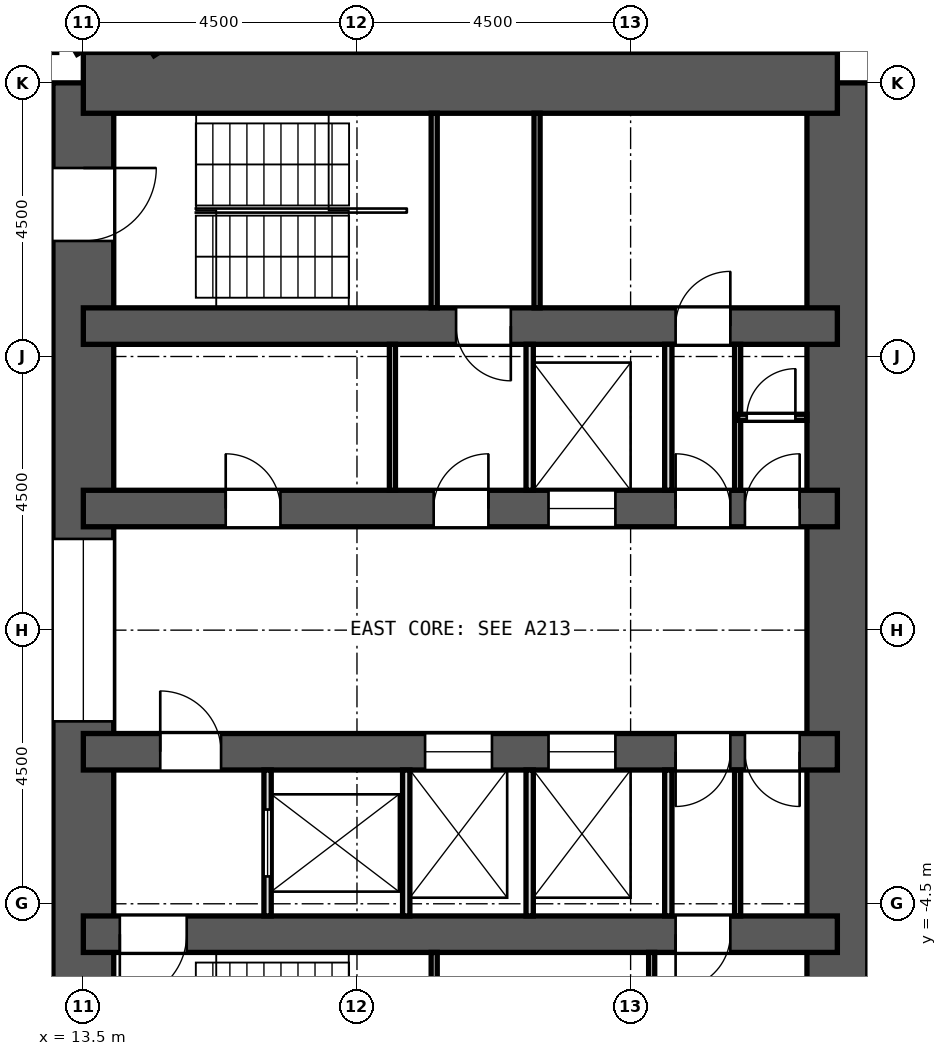
"""IFC4 building model, lengths in metres.
Left out: names, types, materials, properties, quantities, classifications, styles, units other than length and angle.
Written with IfcOpenShell. Run it as: python <this file> out.ifc"""

import sys

from ifc_helpers import new_model, si_unit, direction, frame, frame_2d, origin, place, context, subcontext, project, spatial, rectangle, extrude, element, fill, save


model = new_model("IFC4")
c1 = context("Model", 3, precision=1e-05, world=origin(), true_north=direction((0.0, 1.0)))
c2 = subcontext(c1, "Body", "Model", "MODEL_VIEW")
j1 = project(units=[si_unit("LENGTHUNIT", "METRE"), si_unit("PLANEANGLEUNIT", "RADIAN")], contexts=[c1])
p1 = place(None, origin())
s1 = spatial("IfcSite", under=j1, at=p1, CompositionType="ELEMENT")
p2 = place(p1, origin())
s2 = spatial("IfcBuilding", under=s1, at=p2, CompositionType="ELEMENT")
p3 = place(p2, frame((0.0, 0.0, 65.9)))
s3 = spatial("IfcBuildingStorey", under=s2, at=p3, CompositionType="ELEMENT", Elevation=65.9)
p4 = place(p3, frame((13.5, -9.0, 0.0), z_axis=(0.0, 0.0, 1.0), x_axis=(0.0, 1.0, 0.0)))
e1 = element("IfcWall", 1, at=p4, inside=s3, PredefinedType="SHEAR", context=c2, shape_type="SweptSolid", body=[
    extrude(rectangle(XDim=18.0, YDim=1.0, at=frame_2d((9.0, 0.0))), origin(), (0.0, 0.0, 1.0), 3.3),
])
p5 = place(p4, frame((15.4, 0.0, 0.0)))
e2 = element("IfcOpeningElement", 2, at=p5, cuts=e1, PredefinedType="OPENING", context=c2, shape_type="SweptSolid", body=[
    extrude(rectangle(XDim=1.2, YDim=2.1, at=frame_2d((0.6, 1.05))), frame((0.0, 0.512, 0.0), z_axis=(0.0, -1.0, 0.0), x_axis=(1.0, 0.0, 0.0)), (0.0, 0.0, 1.0), 1.024),
])
p6 = place(p4, frame((1.4, 0.0, 0.0)))
e3 = element("IfcOpeningElement", 3, at=p6, cuts=e1, PredefinedType="OPENING", context=c2, shape_type="SweptSolid", body=[
    extrude(rectangle(XDim=1.2, YDim=2.1, at=frame_2d((0.6, 1.05))), frame((0.0, 0.512, 0.0), z_axis=(0.0, -1.0, 0.0), x_axis=(1.0, 0.0, 0.0)), (0.0, 0.0, 1.0), 1.024),
])
p7 = place(p4, frame((7.5, 0.0, 0.0)))
e4 = element("IfcOpeningElement", 4, at=p7, cuts=e1, PredefinedType="OPENING", context=c2, shape_type="SweptSolid", body=[
    extrude(rectangle(XDim=3.0, YDim=2.4, at=frame_2d((1.5, 1.2))), frame((0.0, 0.512, 0.0), z_axis=(0.0, -1.0, 0.0), x_axis=(1.0, 0.0, 0.0)), (0.0, 0.0, 1.0), 1.024),
])
p8 = place(p3, frame((25.9, -9.0, 0.0), z_axis=(0.0, 0.0, 1.0), x_axis=(0.0, 1.0, 0.0)))
e5 = element("IfcWall", 5, at=p8, inside=s3, PredefinedType="SHEAR", context=c2, shape_type="SweptSolid", body=[
    extrude(rectangle(XDim=18.0, YDim=1.0, at=frame_2d((9.0, 0.0))), origin(), (0.0, 0.0, 1.0), 3.3),
])
p9 = place(p3, frame((13.5, 9.0, 0.0), z_axis=(0.0, 0.0, 1.0), x_axis=(1.0, 0.0, 0.0)))
e6 = element("IfcWall", 6, at=p9, inside=s3, PredefinedType="SHEAR", context=c2, shape_type="SweptSolid", body=[
    extrude(rectangle(XDim=12.4, YDim=1.0, at=frame_2d((6.2, 0.0))), origin(), (0.0, 0.0, 1.0), 3.3),
])
p10 = place(p3, frame((13.5, 5.0, 0.0), z_axis=(0.0, 0.0, 1.0), x_axis=(1.0, 0.0, 0.0)))
e7 = element("IfcWall", 7, at=p10, inside=s3, PredefinedType="SHEAR", context=c2, shape_type="SweptSolid", body=[
    extrude(rectangle(XDim=12.4, YDim=0.6, at=frame_2d((6.2, 0.0))), origin(), (0.0, 0.0, 1.0), 3.3),
])
p11 = place(p10, frame((6.13, 0.0, 0.0)))
e8 = element("IfcOpeningElement", 8, at=p11, cuts=e7, PredefinedType="OPENING", context=c2, shape_type="SweptSolid", body=[
    extrude(rectangle(XDim=0.9, YDim=2.1, at=frame_2d((0.45, 1.05))), frame((0.0, 0.312, 0.0), z_axis=(0.0, -1.0, 0.0), x_axis=(1.0, 0.0, 0.0)), (0.0, 0.0, 1.0), 0.624),
])
p12 = place(p10, frame((9.74, 0.0, 0.0)))
e9 = element("IfcOpeningElement", 9, at=p12, cuts=e7, PredefinedType="OPENING", context=c2, shape_type="SweptSolid", body=[
    extrude(rectangle(XDim=0.9, YDim=2.1, at=frame_2d((0.45, 1.05))), frame((0.0, 0.312, 0.0), z_axis=(0.0, -1.0, 0.0), x_axis=(1.0, 0.0, 0.0)), (0.0, 0.0, 1.0), 0.624),
])
p13 = place(p3, frame((13.5, -5.0, 0.0), z_axis=(0.0, 0.0, 1.0), x_axis=(1.0, 0.0, 0.0)))
e10 = element("IfcWall", 10, at=p13, inside=s3, PredefinedType="SHEAR", context=c2, shape_type="SweptSolid", body=[
    extrude(rectangle(XDim=12.4, YDim=0.6, at=frame_2d((6.2, 0.0))), origin(), (0.0, 0.0, 1.0), 3.3),
])
p14 = place(p13, frame((9.74, 0.0, 0.0)))
e11 = element("IfcOpeningElement", 11, at=p14, cuts=e10, PredefinedType="OPENING", context=c2, shape_type="SweptSolid", body=[
    extrude(rectangle(XDim=0.9, YDim=2.1, at=frame_2d((0.45, 1.05))), frame((0.0, 0.312, 0.0), z_axis=(0.0, -1.0, 0.0), x_axis=(1.0, 0.0, 0.0)), (0.0, 0.0, 1.0), 0.624),
])
p15 = place(p13, frame((0.6, 0.0, 0.0)))
e12 = element("IfcOpeningElement", 12, at=p15, cuts=e10, PredefinedType="OPENING", context=c2, shape_type="SweptSolid", body=[
    extrude(rectangle(XDim=1.1, YDim=2.1, at=frame_2d((0.55, 1.05))), frame((0.0, 0.312, 0.0), z_axis=(0.0, -1.0, 0.0), x_axis=(1.0, 0.0, 0.0)), (0.0, 0.0, 1.0), 0.624),
])
p16 = place(p3, frame((13.5, 2.0, 0.0), z_axis=(0.0, 0.0, 1.0), x_axis=(1.0, 0.0, 0.0)))
e13 = element("IfcWall", 13, at=p16, inside=s3, PredefinedType="SHEAR", context=c2, shape_type="SweptSolid", body=[
    extrude(rectangle(XDim=12.4, YDim=0.6, at=frame_2d((6.2, 0.0))), origin(), (0.0, 0.0, 1.0), 3.3),
])
p17 = place(p16, frame((7.65, 0.0, 0.0)))
e14 = element("IfcOpeningElement", 14, at=p17, cuts=e13, PredefinedType="OPENING", context=c2, shape_type="SweptSolid", body=[
    extrude(rectangle(XDim=1.1, YDim=2.1, at=frame_2d((0.55, 1.05))), frame((0.0, 0.312, 0.0), z_axis=(0.0, -1.0, 0.0), x_axis=(1.0, 0.0, 0.0)), (0.0, 0.0, 1.0), 0.624),
])
p18 = place(p16, frame((2.341, 0.0, 0.0)))
e15 = element("IfcOpeningElement", 15, at=p18, cuts=e13, PredefinedType="OPENING", context=c2, shape_type="SweptSolid", body=[
    extrude(rectangle(XDim=0.9, YDim=2.1, at=frame_2d((0.45, 1.05))), frame((0.0, 0.312, 0.0), z_axis=(0.0, -1.0, 0.0), x_axis=(1.0, 0.0, 0.0)), (0.0, 0.0, 1.0), 0.624),
])
p19 = place(p16, frame((5.761, 0.0, 0.0)))
e16 = element("IfcOpeningElement", 16, at=p19, cuts=e13, PredefinedType="OPENING", context=c2, shape_type="SweptSolid", body=[
    extrude(rectangle(XDim=0.9, YDim=2.1, at=frame_2d((0.45, 1.05))), frame((0.0, 0.312, 0.0), z_axis=(0.0, -1.0, 0.0), x_axis=(1.0, 0.0, 0.0)), (0.0, 0.0, 1.0), 0.624),
])
p20 = place(p16, frame((9.74, 0.0, 0.0)))
e17 = element("IfcOpeningElement", 17, at=p20, cuts=e13, PredefinedType="OPENING", context=c2, shape_type="SweptSolid", body=[
    extrude(rectangle(XDim=0.9, YDim=2.1, at=frame_2d((0.45, 1.05))), frame((0.0, 0.312, 0.0), z_axis=(0.0, -1.0, 0.0), x_axis=(1.0, 0.0, 0.0)), (0.0, 0.0, 1.0), 0.624),
])
p21 = place(p16, frame((10.88, 0.0, 0.0)))
e18 = element("IfcOpeningElement", 18, at=p21, cuts=e13, PredefinedType="OPENING", context=c2, shape_type="SweptSolid", body=[
    extrude(rectangle(XDim=0.9, YDim=2.1, at=frame_2d((0.45, 1.05))), frame((0.0, 0.312, 0.0), z_axis=(0.0, -1.0, 0.0), x_axis=(1.0, 0.0, 0.0)), (0.0, 0.0, 1.0), 0.624),
])
p22 = place(p3, frame((13.5, -2.0, 0.0), z_axis=(0.0, 0.0, 1.0), x_axis=(1.0, 0.0, 0.0)))
e19 = element("IfcWall", 19, at=p22, inside=s3, PredefinedType="SHEAR", context=c2, shape_type="SweptSolid", body=[
    extrude(rectangle(XDim=12.4, YDim=0.6, at=frame_2d((6.2, 0.0))), origin(), (0.0, 0.0, 1.0), 3.3),
])
p23 = place(p22, frame((5.62, 0.0, 0.0)))
e20 = element("IfcOpeningElement", 20, at=p23, cuts=e19, PredefinedType="OPENING", context=c2, shape_type="SweptSolid", body=[
    extrude(rectangle(XDim=1.1, YDim=2.1, at=frame_2d((0.55, 1.05))), frame((0.0, 0.312, 0.0), z_axis=(0.0, -1.0, 0.0), x_axis=(1.0, 0.0, 0.0)), (0.0, 0.0, 1.0), 0.624),
])
p24 = place(p22, frame((7.65, 0.0, 0.0)))
e21 = element("IfcOpeningElement", 21, at=p24, cuts=e19, PredefinedType="OPENING", context=c2, shape_type="SweptSolid", body=[
    extrude(rectangle(XDim=1.1, YDim=2.1, at=frame_2d((0.55, 1.05))), frame((0.0, 0.312, 0.0), z_axis=(0.0, -1.0, 0.0), x_axis=(1.0, 0.0, 0.0)), (0.0, 0.0, 1.0), 0.624),
])
p25 = place(p22, frame((1.265, 0.0, 0.0)))
e22 = element("IfcOpeningElement", 22, at=p25, cuts=e19, PredefinedType="OPENING", context=c2, shape_type="SweptSolid", body=[
    extrude(rectangle(XDim=1.0, YDim=2.1, at=frame_2d((0.5, 1.05))), frame((0.0, 0.312, 0.0), z_axis=(0.0, -1.0, 0.0), x_axis=(1.0, 0.0, 0.0)), (0.0, 0.0, 1.0), 0.624),
])
p26 = place(p22, frame((9.74, 0.0, 0.0)))
e23 = element("IfcOpeningElement", 23, at=p26, cuts=e19, PredefinedType="OPENING", context=c2, shape_type="SweptSolid", body=[
    extrude(rectangle(XDim=0.9, YDim=2.1, at=frame_2d((0.45, 1.05))), frame((0.0, 0.312, 0.0), z_axis=(0.0, -1.0, 0.0), x_axis=(1.0, 0.0, 0.0)), (0.0, 0.0, 1.0), 0.624),
])
p27 = place(p22, frame((10.88, 0.0, 0.0)))
e24 = element("IfcOpeningElement", 24, at=p27, cuts=e19, PredefinedType="OPENING", context=c2, shape_type="SweptSolid", body=[
    extrude(rectangle(XDim=0.9, YDim=2.1, at=frame_2d((0.45, 1.05))), frame((0.0, 0.312, 0.0), z_axis=(0.0, -1.0, 0.0), x_axis=(1.0, 0.0, 0.0)), (0.0, 0.0, 1.0), 0.624),
])
p28 = place(p3, frame((27.523, 7.971, 0.0), z_axis=(0.0, 0.0, 1.0), x_axis=(-0.342028474173, 0.939689588564, 0.0)))
e25 = element("IfcWall", 25, at=p28, inside=s3, PredefinedType="SOLIDWALL", context=c2, shape_type="SweptSolid", body=[
    extrude(rectangle(XDim=3.846, YDim=0.6, at=frame_2d((1.923, 0.0))), origin(), (0.0, 0.0, 1.0), 2.75),
])
p29 = place(p3, frame((13.035, 10.222, 0.0), z_axis=(0.0, 0.0, 1.0), x_axis=(0.49991670217, -0.866073490468, 0.0)))
e26 = element("IfcWall", 26, at=p29, inside=s3, PredefinedType="PARTITIONING", context=c2, shape_type="SweptSolid", body=[
    extrude(rectangle(XDim=0.834, YDim=0.125, at=frame_2d((0.417, 0.0))), origin(), (0.0, 0.0, 1.0), 2.75),
])
p30 = place(p3, frame((14.629, 9.5, 0.0), z_axis=(0.0, 0.0, 1.0), x_axis=(0.838785586694, 0.544461880717, 0.0)))
e27 = element("IfcWall", 27, at=p30, inside=s3, PredefinedType="PARTITIONING", context=c2, shape_type="SweptSolid", body=[
    extrude(rectangle(XDim=1.321, YDim=0.125, at=frame_2d((0.66, 0.0))), origin(), (0.0, 0.0, 1.0), 2.75),
])
p31 = place(p3, frame((18.583, 2.3, 0.0), z_axis=(0.0, 0.0, 1.0), x_axis=(0.0, 1.0, 0.0)))
e28 = element("IfcWall", 28, at=p31, inside=s3, PredefinedType="PARTITIONING", context=c2, shape_type="SweptSolid", body=[
    extrude(rectangle(XDim=2.4, YDim=0.1, at=frame_2d((1.2, 0.0))), origin(), (0.0, 0.0, 1.0), 2.75),
])
for number, where, z_axis, x_axis in (
    (29, (20.84, 2.3, 0.0), (0.0, 0.0, 1.0), (0.0, 1.0, 0.0)),
    (30, (23.12, 2.3, 0.0), (0.0, 0.0, 1.0), (0.0, 1.0, 0.0)),
):
    element("IfcWall", number, at=place(p3, frame(where, z_axis=z_axis, x_axis=x_axis)), inside=s3, PredefinedType="PARTITIONING", context=c2, shape_type="SweptSolid", body=[
        extrude(rectangle(XDim=2.4, YDim=0.12, at=frame_2d((1.2, 0.0))), origin(), (0.0, 0.0, 1.0), 2.75),
    ])
p32 = place(p3, frame((24.26, 2.3, 0.0), z_axis=(0.0, 0.0, 1.0), x_axis=(0.0, 1.0, 0.0)))
e31 = element("IfcWall", 31, at=p32, inside=s3, PredefinedType="PARTITIONING", context=c2, shape_type="SweptSolid", body=[
    extrude(rectangle(XDim=2.4, YDim=0.1, at=frame_2d((1.2, 0.0))), origin(), (0.0, 0.0, 1.0), 2.75),
])
p33 = place(p3, frame((16.53, -4.7, 0.0), z_axis=(0.0, 0.0, 1.0), x_axis=(0.0, 1.0, 0.0)))
e32 = element("IfcWall", 32, at=p33, inside=s3, PredefinedType="PARTITIONING", context=c2, shape_type="SweptSolid", body=[
    extrude(rectangle(XDim=2.4, YDim=0.12, at=frame_2d((1.2, 0.0))), origin(), (0.0, 0.0, 1.0), 2.75),
])
p34 = place(p33, frame((0.65, 0.0, 0.0)))
e33 = element("IfcOpeningElement", 33, at=p34, cuts=e32, PredefinedType="OPENING", context=c2, shape_type="SweptSolid", body=[
    extrude(rectangle(XDim=1.1, YDim=2.1, at=frame_2d((0.55, 1.05))), frame((0.0, 0.072, 0.0), z_axis=(0.0, -1.0, 0.0), x_axis=(1.0, 0.0, 0.0)), (0.0, 0.0, 1.0), 0.144),
])
for number, where, z_axis, x_axis in (
    (34, (18.81, -4.7, 0.0), (0.0, 0.0, 1.0), (0.0, 1.0, 0.0)),
    (35, (20.84, -4.7, 0.0), (0.0, 0.0, 1.0), (0.0, 1.0, 0.0)),
    (36, (23.12, -4.7, 0.0), (0.0, 0.0, 1.0), (0.0, 1.0, 0.0)),
):
    element("IfcWall", number, at=place(p3, frame(where, z_axis=z_axis, x_axis=x_axis)), inside=s3, PredefinedType="PARTITIONING", context=c2, shape_type="SweptSolid", body=[
        extrude(rectangle(XDim=2.4, YDim=0.12, at=frame_2d((1.2, 0.0))), origin(), (0.0, 0.0, 1.0), 2.75),
    ])
p35 = place(p3, frame((24.26, -4.7, 0.0), z_axis=(0.0, 0.0, 1.0), x_axis=(0.0, 1.0, 0.0)))
e37 = element("IfcWall", 37, at=p35, inside=s3, PredefinedType="PARTITIONING", context=c2, shape_type="SweptSolid", body=[
    extrude(rectangle(XDim=2.4, YDim=0.1, at=frame_2d((1.2, 0.0))), origin(), (0.0, 0.0, 1.0), 2.75),
])
p36 = place(p3, frame((24.26, 3.5, 0.0), z_axis=(0.0, 0.0, 1.0), x_axis=(1.0, 0.0, 0.0)))
e38 = element("IfcWall", 38, at=p36, inside=s3, PredefinedType="PARTITIONING", context=c2, shape_type="SweptSolid", body=[
    extrude(rectangle(XDim=1.14, YDim=0.1, at=frame_2d((0.57, 0.0))), origin(), (0.0, 0.0, 1.0), 2.75),
])
p37 = place(p36, frame((0.15, 0.0, 0.0)))
e39 = element("IfcOpeningElement", 39, at=p37, cuts=e38, PredefinedType="OPENING", context=c2, shape_type="SweptSolid", body=[
    extrude(rectangle(XDim=0.8, YDim=2.1, at=frame_2d((0.4, 1.05))), frame((0.0, 0.062, 0.0), z_axis=(0.0, -1.0, 0.0), x_axis=(1.0, 0.0, 0.0)), (0.0, 0.0, 1.0), 0.124),
])
for number, where, z_axis, x_axis in (
    (40, (19.27, 5.3, 0.0), (0.0, 0.0, 1.0), (0.0, 1.0, 0.0)),
    (41, (20.962, 5.3, 0.0), (0.0, 0.0, 1.0), (0.0, 1.0, 0.0)),
    (42, (19.27, -8.5, 0.0), (0.0, 0.0, 1.0), (0.0, 1.0, 0.0)),
):
    element("IfcWall", number, at=place(p3, frame(where, z_axis=z_axis, x_axis=x_axis)), inside=s3, PredefinedType="PARTITIONING", context=c2, shape_type="SweptSolid", body=[
        extrude(rectangle(XDim=3.2, YDim=0.1, at=frame_2d((1.6, 0.0))), origin(), (0.0, 0.0, 1.0), 2.75),
    ])
p38 = place(p3, frame((22.846, -8.5, 0.0), z_axis=(0.0, 0.0, 1.0), x_axis=(0.0, 1.0, 0.0)))
e43 = element("IfcWall", 43, at=p38, inside=s3, PredefinedType="PARTITIONING", context=c2, shape_type="SweptSolid", body=[
    extrude(rectangle(XDim=3.2, YDim=0.1, at=frame_2d((1.6, 0.0))), origin(), (0.0, 0.0, 1.0), 2.75),
])
p39 = place(p38, frame((1.15, 0.0, 0.0)))
e44 = element("IfcOpeningElement", 44, at=p39, cuts=e43, PredefinedType="OPENING", context=c2, shape_type="SweptSolid", body=[
    extrude(rectangle(XDim=0.9, YDim=2.1, at=frame_2d((0.45, 1.05))), frame((0.0, 0.062, 0.0), z_axis=(0.0, -1.0, 0.0), x_axis=(1.0, 0.0, 0.0)), (0.0, 0.0, 1.0), 0.124),
])
p40 = place(p17, origin())
e45 = element("IfcDoor", 45, at=p40, inside=s3, OperationType="DOUBLE_DOOR_SLIDING", PredefinedType="DOOR", context=c2, shape_type="SweptSolid", body=[
    extrude(rectangle(XDim=1.1, YDim=2.1, at=frame_2d((0.55, 1.05))), frame((0.0, 0.025, 0.0), z_axis=(0.0, -1.0, 0.0), x_axis=(1.0, 0.0, 0.0)), (0.0, 0.0, 1.0), 0.05),
])
fill(e14, e45)
p41 = place(p34, origin())
e46 = element("IfcDoor", 46, at=p41, inside=s3, OperationType="DOUBLE_DOOR_SLIDING", PredefinedType="DOOR", context=c2, shape_type="SweptSolid", body=[
    extrude(rectangle(XDim=1.1, YDim=2.1, at=frame_2d((0.55, 1.05))), frame((0.0, 0.025, 0.0), z_axis=(0.0, -1.0, 0.0), x_axis=(1.0, 0.0, 0.0)), (0.0, 0.0, 1.0), 0.05),
])
fill(e33, e46)
p42 = place(p23, origin())
e47 = element("IfcDoor", 47, at=p42, inside=s3, OperationType="DOUBLE_DOOR_SLIDING", PredefinedType="DOOR", context=c2, shape_type="SweptSolid", body=[
    extrude(rectangle(XDim=1.1, YDim=2.1, at=frame_2d((0.55, 1.05))), frame((0.0, 0.025, 0.0), z_axis=(0.0, -1.0, 0.0), x_axis=(1.0, 0.0, 0.0)), (0.0, 0.0, 1.0), 0.05),
])
fill(e20, e47)
p43 = place(p24, origin())
e48 = element("IfcDoor", 48, at=p43, inside=s3, OperationType="DOUBLE_DOOR_SLIDING", PredefinedType="DOOR", context=c2, shape_type="SweptSolid", body=[
    extrude(rectangle(XDim=1.1, YDim=2.1, at=frame_2d((0.55, 1.05))), frame((0.0, 0.025, 0.0), z_axis=(0.0, -1.0, 0.0), x_axis=(1.0, 0.0, 0.0)), (0.0, 0.0, 1.0), 0.05),
])
fill(e21, e48)
p44 = place(p18, origin())
e49 = element("IfcDoor", 49, at=p44, inside=s3, OperationType="SINGLE_SWING_LEFT", PredefinedType="DOOR", context=c2, shape_type="SweptSolid", body=[
    extrude(rectangle(XDim=0.9, YDim=2.1, at=frame_2d((0.45, 1.05))), frame((0.0, 0.025, 0.0), z_axis=(0.0, -1.0, 0.0), x_axis=(1.0, 0.0, 0.0)), (0.0, 0.0, 1.0), 0.05),
])
fill(e15, e49)
p45 = place(p19, origin())
e50 = element("IfcDoor", 50, at=p45, inside=s3, OperationType="SINGLE_SWING_RIGHT", PredefinedType="DOOR", context=c2, shape_type="SweptSolid", body=[
    extrude(rectangle(XDim=0.9, YDim=2.1, at=frame_2d((0.45, 1.05))), frame((0.0, 0.025, 0.0), z_axis=(0.0, -1.0, 0.0), x_axis=(1.0, 0.0, 0.0)), (0.0, 0.0, 1.0), 0.05),
])
fill(e16, e50)
p46 = place(p20, origin())
e51 = element("IfcDoor", 51, at=p46, inside=s3, OperationType="SINGLE_SWING_LEFT", PredefinedType="DOOR", context=c2, shape_type="SweptSolid", body=[
    extrude(rectangle(XDim=0.9, YDim=2.1, at=frame_2d((0.45, 1.05))), frame((0.0, 0.025, 0.0), z_axis=(0.0, -1.0, 0.0), x_axis=(1.0, 0.0, 0.0)), (0.0, 0.0, 1.0), 0.05),
])
fill(e17, e51)
p47 = place(p21, origin())
e52 = element("IfcDoor", 52, at=p47, inside=s3, OperationType="SINGLE_SWING_RIGHT", PredefinedType="DOOR", context=c2, shape_type="SweptSolid", body=[
    extrude(rectangle(XDim=0.9, YDim=2.1, at=frame_2d((0.45, 1.05))), frame((0.0, 0.025, 0.0), z_axis=(0.0, -1.0, 0.0), x_axis=(1.0, 0.0, 0.0)), (0.0, 0.0, 1.0), 0.05),
])
fill(e18, e52)
p48 = place(p25, origin())
e53 = element("IfcDoor", 53, at=p48, inside=s3, OperationType="SINGLE_SWING_LEFT", PredefinedType="DOOR", context=c2, shape_type="SweptSolid", body=[
    extrude(rectangle(XDim=1.0, YDim=2.1, at=frame_2d((0.5, 1.05))), frame((0.0, 0.025, 0.0), z_axis=(0.0, -1.0, 0.0), x_axis=(1.0, 0.0, 0.0)), (0.0, 0.0, 1.0), 0.05),
])
fill(e22, e53)
p49 = place(p26, frame((0.9, 0.0, 0.0), z_axis=(0.0, 0.0, 1.0), x_axis=(-1.0, 0.0, 0.0)))
e54 = element("IfcDoor", 54, at=p49, inside=s3, OperationType="SINGLE_SWING_RIGHT", PredefinedType="DOOR", context=c2, shape_type="SweptSolid", body=[
    extrude(rectangle(XDim=0.9, YDim=2.1, at=frame_2d((0.45, 1.05))), frame((0.0, 0.025, 0.0), z_axis=(0.0, -1.0, 0.0), x_axis=(1.0, 0.0, 0.0)), (0.0, 0.0, 1.0), 0.05),
])
fill(e23, e54)
p50 = place(p27, frame((0.9, 0.0, 0.0), z_axis=(0.0, 0.0, 1.0), x_axis=(-1.0, 0.0, 0.0)))
e55 = element("IfcDoor", 55, at=p50, inside=s3, OperationType="SINGLE_SWING_LEFT", PredefinedType="DOOR", context=c2, shape_type="SweptSolid", body=[
    extrude(rectangle(XDim=0.9, YDim=2.1, at=frame_2d((0.45, 1.05))), frame((0.0, 0.025, 0.0), z_axis=(0.0, -1.0, 0.0), x_axis=(1.0, 0.0, 0.0)), (0.0, 0.0, 1.0), 0.05),
])
fill(e24, e55)
p51 = place(p37, origin())
e56 = element("IfcDoor", 56, at=p51, inside=s3, OperationType="SINGLE_SWING_RIGHT", PredefinedType="DOOR", context=c2, shape_type="SweptSolid", body=[
    extrude(rectangle(XDim=0.8, YDim=2.1, at=frame_2d((0.4, 1.05))), frame((0.0, 0.025, 0.0), z_axis=(0.0, -1.0, 0.0), x_axis=(1.0, 0.0, 0.0)), (0.0, 0.0, 1.0), 0.05),
])
fill(e39, e56)
p52 = place(p11, frame((0.9, 0.0, 0.0), z_axis=(0.0, 0.0, 1.0), x_axis=(-1.0, 0.0, 0.0)))
e57 = element("IfcDoor", 57, at=p52, inside=s3, OperationType="SINGLE_SWING_LEFT", PredefinedType="DOOR", context=c2, shape_type="SweptSolid", body=[
    extrude(rectangle(XDim=0.9, YDim=2.1, at=frame_2d((0.45, 1.05))), frame((0.0, 0.025, 0.0), z_axis=(0.0, -1.0, 0.0), x_axis=(1.0, 0.0, 0.0)), (0.0, 0.0, 1.0), 0.05),
])
fill(e8, e57)
p53 = place(p12, origin())
e58 = element("IfcDoor", 58, at=p53, inside=s3, OperationType="SINGLE_SWING_RIGHT", PredefinedType="DOOR", context=c2, shape_type="SweptSolid", body=[
    extrude(rectangle(XDim=0.9, YDim=2.1, at=frame_2d((0.45, 1.05))), frame((0.0, 0.025, 0.0), z_axis=(0.0, -1.0, 0.0), x_axis=(1.0, 0.0, 0.0)), (0.0, 0.0, 1.0), 0.05),
])
fill(e9, e58)
p54 = place(p14, frame((0.9, 0.0, 0.0), z_axis=(0.0, 0.0, 1.0), x_axis=(-1.0, 0.0, 0.0)))
e59 = element("IfcDoor", 59, at=p54, inside=s3, OperationType="SINGLE_SWING_RIGHT", PredefinedType="DOOR", context=c2, shape_type="SweptSolid", body=[
    extrude(rectangle(XDim=0.9, YDim=2.1, at=frame_2d((0.45, 1.05))), frame((0.0, 0.025, 0.0), z_axis=(0.0, -1.0, 0.0), x_axis=(1.0, 0.0, 0.0)), (0.0, 0.0, 1.0), 0.05),
])
fill(e11, e59)
p55 = place(p15, frame((1.1, 0.0, 0.0), z_axis=(0.0, 0.0, 1.0), x_axis=(-1.0, 0.0, 0.0)))
e60 = element("IfcDoor", 60, at=p55, inside=s3, OperationType="SINGLE_SWING_RIGHT", PredefinedType="DOOR", context=c2, shape_type="SweptSolid", body=[
    extrude(rectangle(XDim=1.1, YDim=2.1, at=frame_2d((0.55, 1.05))), frame((0.0, 0.025, 0.0), z_axis=(0.0, -1.0, 0.0), x_axis=(1.0, 0.0, 0.0)), (0.0, 0.0, 1.0), 0.05),
])
fill(e12, e60)
p56 = place(p5, frame((1.2, 0.0, 0.0), z_axis=(0.0, 0.0, 1.0), x_axis=(-1.0, 0.0, 0.0)))
e61 = element("IfcDoor", 61, at=p56, inside=s3, OperationType="SINGLE_SWING_LEFT", PredefinedType="DOOR", context=c2, shape_type="SweptSolid", body=[
    extrude(rectangle(XDim=1.2, YDim=2.1, at=frame_2d((0.6, 1.05))), frame((0.0, 0.025, 0.0), z_axis=(0.0, -1.0, 0.0), x_axis=(1.0, 0.0, 0.0)), (0.0, 0.0, 1.0), 0.05),
])
fill(e2, e61)
p57 = place(p7, origin())
e62 = element("IfcDoor", 62, at=p57, inside=s3, OperationType="DOUBLE_DOOR_SLIDING", PredefinedType="DOOR", context=c2, shape_type="SweptSolid", body=[
    extrude(rectangle(XDim=3.0, YDim=2.4, at=frame_2d((1.5, 1.2))), frame((0.0, 0.025, 0.0), z_axis=(0.0, -1.0, 0.0), x_axis=(1.0, 0.0, 0.0)), (0.0, 0.0, 1.0), 0.05),
])
fill(e4, e62)
save(model, sys.argv[1])
